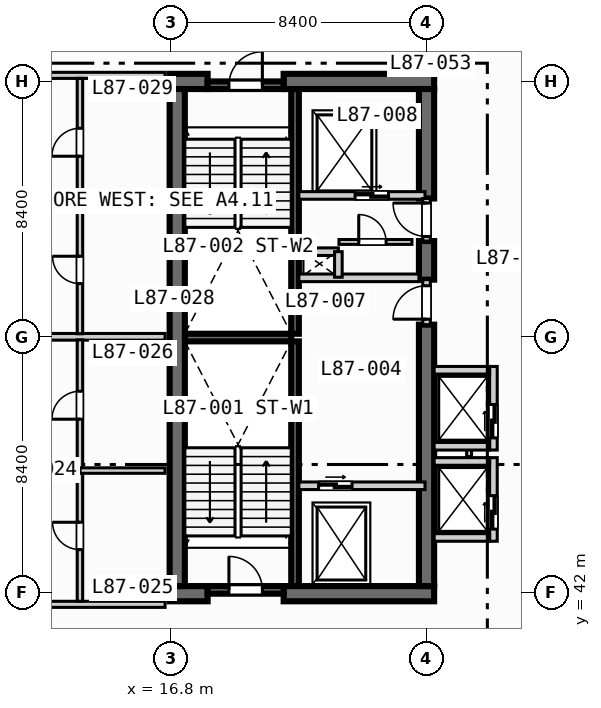
"""IFC4 building model, lengths in metres.
Left out: names, types, materials, properties, quantities, classifications, styles, units other than length and angle.
Written with IfcOpenShell. Run it as: python <this file> out.ifc"""

import sys

from ifc_helpers import new_model, si_unit, direction, frame, frame_2d, origin, place, context, subcontext, project, spatial, rectangle, extrude, element, fill, save


model = new_model("IFC4")
c1 = context("Model", 3, precision=1e-05, world=origin(), true_north=direction((0.0, 1.0)))
c2 = subcontext(c1, "Body", "Model", "MODEL_VIEW")
j1 = project(units=[si_unit("LENGTHUNIT", "METRE"), si_unit("PLANEANGLEUNIT", "RADIAN")], contexts=[c1])
p1 = place(None, origin())
s1 = spatial("IfcSite", under=j1, at=p1, CompositionType="ELEMENT")
p2 = place(p1, origin())
s2 = spatial("IfcBuilding", under=s1, at=p2, CompositionType="ELEMENT")
p3 = place(p2, frame((0.0, 0.0, 351.5)))
s3 = spatial("IfcBuildingStorey", under=s2, at=p3, CompositionType="ELEMENT", Elevation=351.5)
for number, where, z_axis, x_axis in (
    (1, (20.875, 42.2, 0.0), (0.0, 0.0, 1.0), (0.0, 1.0, 0.0)),
    (2, (20.875, 50.5, 0.0), (0.0, 0.0, 1.0), (0.0, 1.0, 0.0)),
):
    element("IfcWall", number, at=place(p3, frame(where, z_axis=z_axis, x_axis=x_axis)), inside=s3, PredefinedType="SOLIDWALL", context=c2, shape_type="SweptSolid", body=[
        extrude(rectangle(XDim=8.05, YDim=0.25, at=frame_2d((4.025, 0.0))), origin(), (0.0, 0.0, 1.0), 3.67),
    ])
p4 = place(p3, frame((17.25, 50.375, 0.0), z_axis=(0.0, 0.0, 1.0), x_axis=(1.0, 0.0, 0.0)))
e3 = element("IfcWall", 3, at=p4, inside=s3, PredefinedType="SOLIDWALL", context=c2, shape_type="SweptSolid", body=[
    extrude(rectangle(XDim=3.5, YDim=0.25, at=frame_2d((1.75, 0.0))), origin(), (0.0, 0.0, 1.0), 3.67),
])
p5 = place(p3, frame((16.75, 41.95, 0.0), z_axis=(0.0, 0.0, 1.0), x_axis=(1.0, 0.0, 0.0)))
e4 = element("IfcWall", 4, at=p5, inside=s3, PredefinedType="SHEAR", context=c2, shape_type="SweptSolid", body=[
    extrude(rectangle(XDim=1.25, YDim=0.5, at=frame_2d((0.625, 0.0))), origin(), (0.0, 0.0, 1.0), 3.67),
])
p6 = place(p3, frame((20.5, 41.95, 0.0), z_axis=(0.0, 0.0, 1.0), x_axis=(1.0, 0.0, 0.0)))
e5 = element("IfcWall", 5, at=p6, inside=s3, PredefinedType="SHEAR", context=c2, shape_type="SweptSolid", body=[
    extrude(rectangle(XDim=4.95, YDim=0.5, at=frame_2d((2.475, 0.0))), origin(), (0.0, 0.0, 1.0), 3.67),
])
p7 = place(p3, frame((16.75, 58.8, 0.0), z_axis=(0.0, 0.0, 1.0), x_axis=(1.0, 0.0, 0.0)))
e6 = element("IfcWall", 6, at=p7, inside=s3, PredefinedType="SHEAR", context=c2, shape_type="SweptSolid", body=[
    extrude(rectangle(XDim=1.25, YDim=0.5, at=frame_2d((0.625, 0.0))), origin(), (0.0, 0.0, 1.0), 3.67),
])
p8 = place(p3, frame((20.5, 58.8, 0.0), z_axis=(0.0, 0.0, 1.0), x_axis=(1.0, 0.0, 0.0)))
e7 = element("IfcWall", 7, at=p8, inside=s3, PredefinedType="SHEAR", context=c2, shape_type="SweptSolid", body=[
    extrude(rectangle(XDim=4.95, YDim=0.5, at=frame_2d((2.475, 0.0))), origin(), (0.0, 0.0, 1.0), 3.67),
])
p9 = place(p3, frame((17.0, 42.2, 0.0), z_axis=(0.0, 0.0, 1.0), x_axis=(0.0, 1.0, 0.0)))
e8 = element("IfcWall", 8, at=p9, inside=s3, PredefinedType="SHEAR", context=c2, shape_type="SweptSolid", body=[
    extrude(rectangle(XDim=16.35, YDim=0.5, at=frame_2d((8.175, 0.0))), origin(), (0.0, 0.0, 1.0), 3.67),
])
p10 = place(p3, frame((25.2, 42.2, 0.0), z_axis=(0.0, 0.0, 1.0), x_axis=(0.0, 1.0, 0.0)))
e9 = element("IfcWall", 9, at=p10, inside=s3, PredefinedType="SHEAR", context=c2, shape_type="SweptSolid", body=[
    extrude(rectangle(XDim=8.6, YDim=0.5, at=frame_2d((4.3, 0.0))), origin(), (0.0, 0.0, 1.0), 3.67),
])
p11 = place(p3, frame((25.2, 52.28, 0.0), z_axis=(0.0, 0.0, 1.0), x_axis=(0.0, 1.0, 0.0)))
e10 = element("IfcWall", 10, at=p11, inside=s3, PredefinedType="SHEAR", context=c2, shape_type="SweptSolid", body=[
    extrude(rectangle(XDim=1.27, YDim=0.5, at=frame_2d((0.635, 0.0))), origin(), (0.0, 0.0, 1.0), 3.67),
])
p12 = place(p3, frame((25.2, 54.95, 0.0), z_axis=(0.0, 0.0, 1.0), x_axis=(0.0, 1.0, 0.0)))
e11 = element("IfcWall", 11, at=p12, inside=s3, PredefinedType="SHEAR", context=c2, shape_type="SweptSolid", body=[
    extrude(rectangle(XDim=3.6, YDim=0.5, at=frame_2d((1.8, 0.0))), origin(), (0.0, 0.0, 1.0), 3.67),
])
p13 = place(p3, frame((18.0, 42.075, 0.0), z_axis=(0.0, 0.0, 1.0), x_axis=(1.0, 0.0, 0.0)))
e12 = element("IfcWall", 12, at=p13, inside=s3, PredefinedType="SOLIDWALL", context=c2, shape_type="SweptSolid", body=[
    extrude(rectangle(XDim=2.5, YDim=0.25, at=frame_2d((1.25, 0.0))), origin(), (0.0, 0.0, 1.0), 3.67),
])
p14 = place(p13, frame((0.7, 0.0, 0.0)))
e13 = element("IfcOpeningElement", 13, at=p14, cuts=e12, PredefinedType="OPENING", context=c2, shape_type="SweptSolid", body=[
    extrude(rectangle(XDim=1.1, YDim=2.15, at=frame_2d((0.55, 1.075))), frame((0.0, 0.135, 0.0), z_axis=(0.0, -1.0, 0.0), x_axis=(1.0, 0.0, 0.0)), (0.0, 0.0, 1.0), 0.27),
])
p15 = place(p3, frame((18.0, 58.675, 0.0), z_axis=(0.0, 0.0, 1.0), x_axis=(1.0, 0.0, 0.0)))
e14 = element("IfcWall", 14, at=p15, inside=s3, PredefinedType="SOLIDWALL", context=c2, shape_type="SweptSolid", body=[
    extrude(rectangle(XDim=2.5, YDim=0.25, at=frame_2d((1.25, 0.0))), origin(), (0.0, 0.0, 1.0), 3.67),
])
p16 = place(p15, frame((0.7, 0.0, 0.0)))
e15 = element("IfcOpeningElement", 15, at=p16, cuts=e14, PredefinedType="OPENING", context=c2, shape_type="SweptSolid", body=[
    extrude(rectangle(XDim=1.1, YDim=2.15, at=frame_2d((0.55, 1.075))), frame((0.0, 0.135, 0.0), z_axis=(0.0, -1.0, 0.0), x_axis=(1.0, 0.0, 0.0)), (0.0, 0.0, 1.0), 0.27),
])
p17 = place(p3, frame((21.0, 45.5, 0.0), z_axis=(0.0, 0.0, 1.0), x_axis=(1.0, 0.0, 0.0)))
e16 = element("IfcWall", 16, at=p17, inside=s3, PredefinedType="SOLIDWALL", context=c2, shape_type="SweptSolid", body=[
    extrude(rectangle(XDim=4.15, YDim=0.25, at=frame_2d((2.075, 0.0))), origin(), (0.0, 0.0, 1.0), 3.67),
])
p18 = place(p17, frame((0.65, 0.0, 0.0)))
e17 = element("IfcOpeningElement", 17, at=p18, cuts=e16, PredefinedType="OPENING", context=c2, shape_type="SweptSolid", body=[
    extrude(rectangle(XDim=1.1, YDim=2.15, at=frame_2d((0.55, 1.075))), frame((0.0, 0.135, 0.0), z_axis=(0.0, -1.0, 0.0), x_axis=(1.0, 0.0, 0.0)), (0.0, 0.0, 1.0), 0.27),
])
p19 = place(p3, frame((25.2, 50.8, 0.0), z_axis=(0.0, 0.0, 1.0), x_axis=(0.0, 1.0, 0.0)))
e18 = element("IfcWall", 18, at=p19, inside=s3, PredefinedType="SOLIDWALL", context=c2, shape_type="SweptSolid", body=[
    extrude(rectangle(XDim=1.48, YDim=0.25, at=frame_2d((0.74, 0.0))), origin(), (0.0, 0.0, 1.0), 3.67),
])
p20 = place(p19, frame((0.18, 0.0, 0.0)))
e19 = element("IfcOpeningElement", 19, at=p20, cuts=e18, PredefinedType="OPENING", context=c2, shape_type="SweptSolid", body=[
    extrude(rectangle(XDim=1.1, YDim=2.15, at=frame_2d((0.55, 1.075))), frame((0.0, 0.135, 0.0), z_axis=(0.0, -1.0, 0.0), x_axis=(1.0, 0.0, 0.0)), (0.0, 0.0, 1.0), 0.27),
])
p21 = place(p3, frame((21.0, 52.34, 0.0), z_axis=(0.0, 0.0, 1.0), x_axis=(1.0, 0.0, 0.0)))
e20 = element("IfcWall", 20, at=p21, inside=s3, PredefinedType="SOLIDWALL", context=c2, shape_type="SweptSolid", body=[
    extrude(rectangle(XDim=3.95, YDim=0.25, at=frame_2d((1.975, 0.0))), origin(), (0.0, 0.0, 1.0), 3.67),
])
p22 = place(p3, frame((21.0, 55.05, 0.0), z_axis=(0.0, 0.0, 1.0), x_axis=(1.0, 0.0, 0.0)))
e21 = element("IfcWall", 21, at=p22, inside=s3, PredefinedType="SOLIDWALL", context=c2, shape_type="SweptSolid", body=[
    extrude(rectangle(XDim=4.15, YDim=0.25, at=frame_2d((2.075, 0.0))), origin(), (0.0, 0.0, 1.0), 3.67),
])
p23 = place(p22, frame((1.85, 0.0, 0.0)))
e22 = element("IfcOpeningElement", 22, at=p23, cuts=e21, PredefinedType="OPENING", context=c2, shape_type="SweptSolid", body=[
    extrude(rectangle(XDim=1.1, YDim=2.15, at=frame_2d((0.55, 1.075))), frame((0.0, 0.135, 0.0), z_axis=(0.0, -1.0, 0.0), x_axis=(1.0, 0.0, 0.0)), (0.0, 0.0, 1.0), 0.27),
])
p24 = place(p3, frame((25.2, 53.55, 0.0), z_axis=(0.0, 0.0, 1.0), x_axis=(0.0, 1.0, 0.0)))
e23 = element("IfcWall", 23, at=p24, inside=s3, PredefinedType="SOLIDWALL", context=c2, shape_type="SweptSolid", body=[
    extrude(rectangle(XDim=1.4, YDim=0.25, at=frame_2d((0.7, 0.0))), origin(), (0.0, 0.0, 1.0), 3.67),
])
p25 = place(p24, frame((0.15, 0.0, 0.0)))
e24 = element("IfcOpeningElement", 24, at=p25, cuts=e23, PredefinedType="OPENING", context=c2, shape_type="SweptSolid", body=[
    extrude(rectangle(XDim=1.1, YDim=2.15, at=frame_2d((0.55, 1.075))), frame((0.0, 0.135, 0.0), z_axis=(0.0, -1.0, 0.0), x_axis=(1.0, 0.0, 0.0)), (0.0, 0.0, 1.0), 0.27),
])
p26 = place(p3, frame((21.0, 53.2, 0.0), z_axis=(0.0, 0.0, 1.0), x_axis=(1.0, 0.0, 0.0)))
e25 = element("IfcWall", 25, at=p26, inside=s3, PredefinedType="SOLIDWALL", context=c2, shape_type="SweptSolid", body=[
    extrude(rectangle(XDim=1.3, YDim=0.25, at=frame_2d((0.65, 0.0))), origin(), (0.0, 0.0, 1.0), 3.67),
])
p27 = place(p3, frame((22.3, 52.36, 0.0), z_axis=(0.0, 0.0, 1.0), x_axis=(0.0, 1.0, 0.0)))
e26 = element("IfcWall", 26, at=p27, inside=s3, PredefinedType="SOLIDWALL", context=c2, shape_type="SweptSolid", body=[
    extrude(rectangle(XDim=0.84, YDim=0.25, at=frame_2d((0.42, 0.0))), origin(), (0.0, 0.0, 1.0), 3.67),
])
p28 = place(p3, frame((22.32, 53.52, 0.0), z_axis=(0.0, 0.0, 1.0), x_axis=(1.0, 0.0, 0.0)))
e27 = element("IfcWall", 27, at=p28, inside=s3, PredefinedType="PARTITIONING", context=c2, shape_type="SweptSolid", body=[
    extrude(rectangle(XDim=2.4, YDim=0.16, at=frame_2d((1.2, 0.0))), origin(), (0.0, 0.0, 1.0), 3.67),
])
p29 = place(p28, frame((0.65, 0.0, 0.0)))
e28 = element("IfcOpeningElement", 28, at=p29, cuts=e27, PredefinedType="OPENING", context=c2, shape_type="SweptSolid", body=[
    extrude(rectangle(XDim=0.9, YDim=2.1, at=frame_2d((0.45, 1.05))), frame((0.0, 0.09, 0.0), z_axis=(0.0, -1.0, 0.0), x_axis=(1.0, 0.0, 0.0)), (0.0, 0.0, 1.0), 0.18),
])
p30 = place(p3, frame((27.4, 43.675, 0.0), z_axis=(0.0, 0.0, 1.0), x_axis=(0.0, 1.0, 0.0)))
e29 = element("IfcWall", 29, at=p30, inside=s3, PredefinedType="SOLIDWALL", context=c2, shape_type="SweptSolid", body=[
    extrude(rectangle(XDim=2.75, YDim=0.25, at=frame_2d((1.375, 0.0))), origin(), (0.0, 0.0, 1.0), 3.67),
])
p31 = place(p30, frame((0.4, 0.0, 0.0)))
e30 = element("IfcOpeningElement", 30, at=p31, cuts=e29, PredefinedType="OPENING", context=c2, shape_type="SweptSolid", body=[
    extrude(rectangle(XDim=1.1, YDim=2.15, at=frame_2d((0.55, 1.075))), frame((0.0, 0.135, 0.0), z_axis=(0.0, -1.0, 0.0), x_axis=(1.0, 0.0, 0.0)), (0.0, 0.0, 1.0), 0.27),
])
for number, where, z_axis, x_axis in (
    (31, (25.45, 43.8, 0.0), (0.0, 0.0, 1.0), (1.0, 0.0, 0.0)),
    (32, (25.45, 46.3, 0.0), (0.0, 0.0, 1.0), (1.0, 0.0, 0.0)),
):
    element("IfcWall", number, at=place(p3, frame(where, z_axis=z_axis, x_axis=x_axis)), inside=s3, PredefinedType="SOLIDWALL", context=c2, shape_type="SweptSolid", body=[
        extrude(rectangle(XDim=1.825, YDim=0.25, at=frame_2d((0.913, 0.0))), origin(), (0.0, 0.0, 1.0), 3.67),
    ])
p32 = place(p3, frame((26.6, 46.46, 0.0), z_axis=(0.0, 0.0, 1.0), x_axis=(0.0, 1.0, 0.0)))
e33 = element("IfcWall", 33, at=p32, inside=s3, PredefinedType="PARTITIONING", context=c2, shape_type="SweptSolid", body=[
    extrude(rectangle(XDim=0.88, YDim=0.16, at=frame_2d((0.44, 0.0))), origin(), (0.0, 0.0, 1.0), 3.67),
])
p33 = place(p3, frame((27.4, 46.675, 0.0), z_axis=(0.0, 0.0, 1.0), x_axis=(0.0, 1.0, 0.0)))
e34 = element("IfcWall", 34, at=p33, inside=s3, PredefinedType="SOLIDWALL", context=c2, shape_type="SweptSolid", body=[
    extrude(rectangle(XDim=2.75, YDim=0.25, at=frame_2d((1.375, 0.0))), origin(), (0.0, 0.0, 1.0), 3.67),
])
p34 = place(p33, frame((0.4, 0.0, 0.0)))
e35 = element("IfcOpeningElement", 35, at=p34, cuts=e34, PredefinedType="OPENING", context=c2, shape_type="SweptSolid", body=[
    extrude(rectangle(XDim=1.1, YDim=2.15, at=frame_2d((0.55, 1.075))), frame((0.0, 0.135, 0.0), z_axis=(0.0, -1.0, 0.0), x_axis=(1.0, 0.0, 0.0)), (0.0, 0.0, 1.0), 0.27),
])
for number, where, z_axis, x_axis in (
    (36, (25.45, 46.8, 0.0), (0.0, 0.0, 1.0), (1.0, 0.0, 0.0)),
    (37, (25.45, 49.3, 0.0), (0.0, 0.0, 1.0), (1.0, 0.0, 0.0)),
):
    element("IfcWall", number, at=place(p3, frame(where, z_axis=z_axis, x_axis=x_axis)), inside=s3, PredefinedType="SOLIDWALL", context=c2, shape_type="SweptSolid", body=[
        extrude(rectangle(XDim=1.825, YDim=0.25, at=frame_2d((0.913, 0.0))), origin(), (0.0, 0.0, 1.0), 3.67),
    ])
p35 = place(p3, frame((8.65, 41.6, 0.0), z_axis=(0.0, 0.0, 1.0), x_axis=(1.0, 0.0, 0.0)))
e38 = element("IfcWall", 38, at=p35, inside=s3, PredefinedType="PARTITIONING", context=c2, shape_type="SweptSolid", body=[
    extrude(rectangle(XDim=7.95, YDim=0.2, at=frame_2d((3.975, 0.0))), origin(), (0.0, 0.0, 1.0), 3.67),
])
p36 = place(p35, frame((2.0, 0.0, 0.0)))
e39 = element("IfcOpeningElement", 39, at=p36, cuts=e38, PredefinedType="OPENING", context=c2, shape_type="SweptSolid", body=[
    extrude(rectangle(XDim=1.0, YDim=2.15, at=frame_2d((0.5, 1.075))), frame((0.0, 0.11, 0.0), z_axis=(0.0, -1.0, 0.0), x_axis=(1.0, 0.0, 0.0)), (0.0, 0.0, 1.0), 0.22),
])
p37 = place(p3, frame((8.65, 59.0, 0.0), z_axis=(0.0, 0.0, 1.0), x_axis=(1.0, 0.0, 0.0)))
e40 = element("IfcWall", 40, at=p37, inside=s3, PredefinedType="PARTITIONING", context=c2, shape_type="SweptSolid", body=[
    extrude(rectangle(XDim=7.95, YDim=0.2, at=frame_2d((3.975, 0.0))), origin(), (0.0, 0.0, 1.0), 3.127),
])
p38 = place(p37, frame((2.0, 0.0, 0.0)))
e41 = element("IfcOpeningElement", 41, at=p38, cuts=e40, PredefinedType="OPENING", context=c2, shape_type="SweptSolid", body=[
    extrude(rectangle(XDim=1.0, YDim=2.15, at=frame_2d((0.5, 1.075))), frame((0.0, 0.11, 0.0), z_axis=(0.0, -1.0, 0.0), x_axis=(1.0, 0.0, 0.0)), (0.0, 0.0, 1.0), 0.22),
])
p39 = place(p3, frame((8.65, 50.4, 0.0), z_axis=(0.0, 0.0, 1.0), x_axis=(1.0, 0.0, 0.0)))
e42 = element("IfcWall", 42, at=p39, inside=s3, PredefinedType="PARTITIONING", context=c2, shape_type="SweptSolid", body=[
    extrude(rectangle(XDim=7.95, YDim=0.22, at=frame_2d((3.975, 0.0))), origin(), (0.0, 0.0, 1.0), 3.07),
])
p40 = place(p3, frame((13.8, 41.7, 0.0), z_axis=(0.0, 0.0, 1.0), x_axis=(0.0, 1.0, 0.0)))
e43 = element("IfcWall", 43, at=p40, inside=s3, PredefinedType="PLUMBINGWALL", context=c2, shape_type="SweptSolid", body=[
    extrude(rectangle(XDim=8.6, YDim=0.18, at=frame_2d((4.3, 0.0))), origin(), (0.0, 0.0, 1.0), 3.67),
])
p41 = place(p40, frame((1.7, 0.0, 0.0)))
e44 = element("IfcOpeningElement", 44, at=p41, cuts=e43, PredefinedType="OPENING", context=c2, shape_type="SweptSolid", body=[
    extrude(rectangle(XDim=0.9, YDim=2.1, at=frame_2d((0.45, 1.05))), frame((0.0, 0.1, 0.0), z_axis=(0.0, -1.0, 0.0), x_axis=(1.0, 0.0, 0.0)), (0.0, 0.0, 1.0), 0.2),
])
p42 = place(p40, frame((5.99, 0.0, 0.0)))
e45 = element("IfcOpeningElement", 45, at=p42, cuts=e43, PredefinedType="OPENING", context=c2, shape_type="SweptSolid", body=[
    extrude(rectangle(XDim=0.92, YDim=2.1, at=frame_2d((0.46, 1.05))), frame((0.0, 0.1, 0.0), z_axis=(0.0, -1.0, 0.0), x_axis=(1.0, 0.0, 0.0)), (0.0, 0.0, 1.0), 0.2),
])
p43 = place(p3, frame((13.8, 46.0, 0.0), z_axis=(0.0, 0.0, 1.0), x_axis=(1.0, 0.0, 0.0)))
e46 = element("IfcWall", 46, at=p43, inside=s3, PredefinedType="PLUMBINGWALL", context=c2, shape_type="SweptSolid", body=[
    extrude(rectangle(XDim=2.8, YDim=0.18, at=frame_2d((1.4, 0.0))), origin(), (0.0, 0.0, 1.0), 3.67),
])
p44 = place(p3, frame((13.8, 50.5, 0.0), z_axis=(0.0, 0.0, 1.0), x_axis=(0.0, 1.0, 0.0)))
e47 = element("IfcWall", 47, at=p44, inside=s3, PredefinedType="PLUMBINGWALL", context=c2, shape_type="SweptSolid", body=[
    extrude(rectangle(XDim=8.4, YDim=0.18, at=frame_2d((4.2, 0.0))), origin(), (0.0, 0.0, 1.0), 3.67),
])
p45 = place(p44, frame((1.65, 0.0, 0.0)))
e48 = element("IfcOpeningElement", 48, at=p45, cuts=e47, PredefinedType="OPENING", context=c2, shape_type="SweptSolid", body=[
    extrude(rectangle(XDim=0.9, YDim=2.1, at=frame_2d((0.45, 1.05))), frame((0.0, 0.1, 0.0), z_axis=(0.0, -1.0, 0.0), x_axis=(1.0, 0.0, 0.0)), (0.0, 0.0, 1.0), 0.2),
])
p46 = place(p44, frame((5.84, 0.0, 0.0)))
e49 = element("IfcOpeningElement", 49, at=p46, cuts=e47, PredefinedType="OPENING", context=c2, shape_type="SweptSolid", body=[
    extrude(rectangle(XDim=0.92, YDim=2.1, at=frame_2d((0.46, 1.05))), frame((0.0, 0.1, 0.0), z_axis=(0.0, -1.0, 0.0), x_axis=(1.0, 0.0, 0.0)), (0.0, 0.0, 1.0), 0.2),
])
p47 = place(p3, frame((13.8, 54.7, 0.0), z_axis=(0.0, 0.0, 1.0), x_axis=(1.0, 0.0, 0.0)))
e50 = element("IfcWall", 50, at=p47, inside=s3, PredefinedType="PLUMBINGWALL", context=c2, shape_type="SweptSolid", body=[
    extrude(rectangle(XDim=2.8, YDim=0.18, at=frame_2d((1.4, 0.0))), origin(), (0.0, 0.0, 1.0), 3.67),
])
p48 = place(p14, origin())
e51 = element("IfcDoor", 51, at=p48, inside=s3, OperationType="SINGLE_SWING_LEFT", PredefinedType="DOOR", context=c2, shape_type="SweptSolid", body=[
    extrude(rectangle(XDim=1.1, YDim=2.15, at=frame_2d((0.55, 1.075))), frame((0.0, 0.025, 0.0), z_axis=(0.0, -1.0, 0.0), x_axis=(1.0, 0.0, 0.0)), (0.0, 0.0, 1.0), 0.05),
])
fill(e13, e51)
p49 = place(p16, origin())
e52 = element("IfcDoor", 52, at=p49, inside=s3, OperationType="SINGLE_SWING_RIGHT", PredefinedType="DOOR", context=c2, shape_type="SweptSolid", body=[
    extrude(rectangle(XDim=1.1, YDim=2.15, at=frame_2d((0.55, 1.075))), frame((0.0, 0.025, 0.0), z_axis=(0.0, -1.0, 0.0), x_axis=(1.0, 0.0, 0.0)), (0.0, 0.0, 1.0), 0.05),
])
fill(e15, e52)
p50 = place(p18, origin())
e53 = element("IfcDoor", 53, at=p50, inside=s3, OperationType="SLIDING_TO_LEFT", PredefinedType="DOOR", context=c2, shape_type="SweptSolid", body=[
    extrude(rectangle(XDim=1.1, YDim=2.15, at=frame_2d((0.55, 1.075))), frame((0.0, 0.025, 0.0), z_axis=(0.0, -1.0, 0.0), x_axis=(1.0, 0.0, 0.0)), (0.0, 0.0, 1.0), 0.05),
])
fill(e17, e53)
p51 = place(p20, origin())
e54 = element("IfcDoor", 54, at=p51, inside=s3, OperationType="SINGLE_SWING_LEFT", PredefinedType="DOOR", context=c2, shape_type="SweptSolid", body=[
    extrude(rectangle(XDim=1.1, YDim=2.15, at=frame_2d((0.55, 1.075))), frame((0.0, 0.025, 0.0), z_axis=(0.0, -1.0, 0.0), x_axis=(1.0, 0.0, 0.0)), (0.0, 0.0, 1.0), 0.05),
])
fill(e19, e54)
p52 = place(p23, origin())
e55 = element("IfcDoor", 55, at=p52, inside=s3, OperationType="SLIDING_TO_LEFT", PredefinedType="DOOR", context=c2, shape_type="SweptSolid", body=[
    extrude(rectangle(XDim=1.1, YDim=2.15, at=frame_2d((0.55, 1.075))), frame((0.0, 0.025, 0.0), z_axis=(0.0, -1.0, 0.0), x_axis=(1.0, 0.0, 0.0)), (0.0, 0.0, 1.0), 0.05),
])
fill(e22, e55)
p53 = place(p25, origin())
e56 = element("IfcDoor", 56, at=p53, inside=s3, OperationType="SINGLE_SWING_RIGHT", PredefinedType="DOOR", context=c2, shape_type="SweptSolid", body=[
    extrude(rectangle(XDim=1.1, YDim=2.15, at=frame_2d((0.55, 1.075))), frame((0.0, 0.025, 0.0), z_axis=(0.0, -1.0, 0.0), x_axis=(1.0, 0.0, 0.0)), (0.0, 0.0, 1.0), 0.05),
])
fill(e24, e56)
p54 = place(p29, origin())
e57 = element("IfcDoor", 57, at=p54, inside=s3, OperationType="SINGLE_SWING_LEFT", PredefinedType="DOOR", context=c2, shape_type="SweptSolid", body=[
    extrude(rectangle(XDim=0.9, YDim=2.1, at=frame_2d((0.45, 1.05))), frame((0.0, 0.025, 0.0), z_axis=(0.0, -1.0, 0.0), x_axis=(1.0, 0.0, 0.0)), (0.0, 0.0, 1.0), 0.05),
])
fill(e28, e57)
p55 = place(p31, origin())
e58 = element("IfcDoor", 58, at=p55, inside=s3, OperationType="SLIDING_TO_LEFT", PredefinedType="DOOR", context=c2, shape_type="SweptSolid", body=[
    extrude(rectangle(XDim=1.1, YDim=2.15, at=frame_2d((0.55, 1.075))), frame((0.0, 0.025, 0.0), z_axis=(0.0, -1.0, 0.0), x_axis=(1.0, 0.0, 0.0)), (0.0, 0.0, 1.0), 0.05),
])
fill(e30, e58)
p56 = place(p34, origin())
e59 = element("IfcDoor", 59, at=p56, inside=s3, OperationType="SLIDING_TO_LEFT", PredefinedType="DOOR", context=c2, shape_type="SweptSolid", body=[
    extrude(rectangle(XDim=1.1, YDim=2.15, at=frame_2d((0.55, 1.075))), frame((0.0, 0.025, 0.0), z_axis=(0.0, -1.0, 0.0), x_axis=(1.0, 0.0, 0.0)), (0.0, 0.0, 1.0), 0.05),
])
fill(e35, e59)
p57 = place(p41, origin())
e60 = element("IfcDoor", 60, at=p57, inside=s3, OperationType="SINGLE_SWING_RIGHT", PredefinedType="DOOR", context=c2, shape_type="SweptSolid", body=[
    extrude(rectangle(XDim=0.9, YDim=2.1, at=frame_2d((0.45, 1.05))), frame((0.0, 0.025, 0.0), z_axis=(0.0, -1.0, 0.0), x_axis=(1.0, 0.0, 0.0)), (0.0, 0.0, 1.0), 0.05),
])
fill(e44, e60)
p58 = place(p42, origin())
e61 = element("IfcDoor", 61, at=p58, inside=s3, OperationType="SINGLE_SWING_LEFT", PredefinedType="DOOR", context=c2, shape_type="SweptSolid", body=[
    extrude(rectangle(XDim=0.92, YDim=2.1, at=frame_2d((0.46, 1.05))), frame((0.0, 0.025, 0.0), z_axis=(0.0, -1.0, 0.0), x_axis=(1.0, 0.0, 0.0)), (0.0, 0.0, 1.0), 0.05),
])
fill(e45, e61)
p59 = place(p45, origin())
e62 = element("IfcDoor", 62, at=p59, inside=s3, OperationType="SINGLE_SWING_RIGHT", PredefinedType="DOOR", context=c2, shape_type="SweptSolid", body=[
    extrude(rectangle(XDim=0.9, YDim=2.1, at=frame_2d((0.45, 1.05))), frame((0.0, 0.025, 0.0), z_axis=(0.0, -1.0, 0.0), x_axis=(1.0, 0.0, 0.0)), (0.0, 0.0, 1.0), 0.05),
])
fill(e48, e62)
p60 = place(p46, origin())
e63 = element("IfcDoor", 63, at=p60, inside=s3, OperationType="SINGLE_SWING_LEFT", PredefinedType="DOOR", context=c2, shape_type="SweptSolid", body=[
    extrude(rectangle(XDim=0.92, YDim=2.1, at=frame_2d((0.46, 1.05))), frame((0.0, 0.025, 0.0), z_axis=(0.0, -1.0, 0.0), x_axis=(1.0, 0.0, 0.0)), (0.0, 0.0, 1.0), 0.05),
])
fill(e49, e63)
save(model, sys.argv[1])
